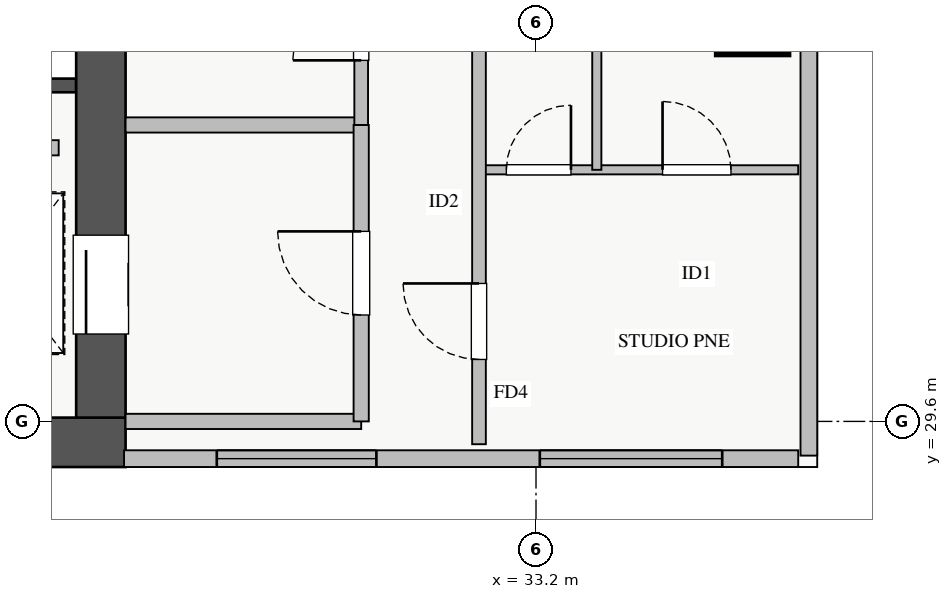
"""IFC4 building model, lengths in metres.
Left out: names, types, materials, properties, quantities, classifications, styles, units other than length and angle.
Written with IfcOpenShell. Run it as: python <this file> out.ifc"""

import sys

from ifc_helpers import new_model, si_unit, direction, frame, frame_2d, origin, origin_2d, place, context, subcontext, project, spatial, rectangle, extrude, source, transform, mapped, element, fill, save


model = new_model("IFC4")
c1 = context("Model", 3, precision=1e-05, world=origin(), true_north=direction((0.0, 1.0)))
c2 = subcontext(c1, "Body", "Model", "MODEL_VIEW")
j1 = project(units=[si_unit("LENGTHUNIT", "METRE"), si_unit("PLANEANGLEUNIT", "RADIAN")], contexts=[c1])
p1 = place(None, origin())
s1 = spatial("IfcSite", under=j1, at=p1, CompositionType="ELEMENT")
p2 = place(p1, origin())
s2 = spatial("IfcBuilding", under=s1, at=p2, CompositionType="ELEMENT")
p3 = place(p2, frame((0.0, 0.0, 156.75)))
s3 = spatial("IfcBuildingStorey", under=s2, at=p3, CompositionType="ELEMENT", Elevation=156.75)
p4 = place(p3, frame((25.8, 34.02, 0.0), z_axis=(0.0, 0.0, 1.0), x_axis=(1.0, 0.0, 0.0)))
e1 = element("IfcWall", 1, at=p4, inside=s3, PredefinedType="SHEAR", context=c2, shape_type="SweptSolid", body=[
    extrude(rectangle(XDim=1.35, YDim=0.18, at=frame_2d((0.675, 0.0))), origin(), (0.0, 0.0, 1.0), 3.07),
])
p5 = place(p3, frame((10.2, 29.325, 0.0), z_axis=(0.0, 0.0, 1.0), x_axis=(1.0, 0.0, 0.0)))
e2 = element("IfcWall", 2, at=p5, inside=s3, PredefinedType="SHEAR", context=c2, shape_type="SweptSolid", body=[
    extrude(rectangle(XDim=17.6, YDim=0.65, at=frame_2d((8.8, 0.0))), origin(), (0.0, 0.0, 1.0), 3.25),
])
p6 = place(p3, frame((27.475, 29.65, 0.0), z_axis=(0.0, 0.0, 1.0), x_axis=(0.0, 1.0, 0.0)))
e3 = element("IfcWall", 3, at=p6, inside=s3, PredefinedType="SHEAR", context=c2, shape_type="SweptSolid", body=[
    extrude(rectangle(XDim=5.9, YDim=0.65, at=frame_2d((2.95, 0.0))), origin(), (0.0, 0.0, 1.0), 3.25),
])
p7 = place(p6, frame((1.1, 0.0, 0.0)))
e4 = element("IfcOpeningElement", 4, at=p7, cuts=e3, PredefinedType="OPENING", context=c2, shape_type="SweptSolid", body=[
    extrude(rectangle(XDim=1.3, YDim=2.05, at=frame_2d((0.65, 1.025))), frame((0.0, 0.335, 0.0), z_axis=(0.0, -1.0, 0.0), x_axis=(1.0, 0.0, 0.0)), (0.0, 0.0, 1.0), 0.67),
])
m1 = source(origin(), c2, "Body", "SweptSolid", [
    extrude(rectangle(XDim=0.95, YDim=0.95, at=origin_2d()), origin(), (0.0, 0.0, 1.0), 3.25),
])
p8 = place(p3, frame((36.05, 34.9, 0.0), z_axis=(0.0, 0.0, 1.0), x_axis=(1.0, 0.0, 0.0)))
e5 = element("IfcColumn", 5, at=p8, inside=s3, PredefinedType="COLUMN", context=c2, shape_type="MappedRepresentation", body=[
    mapped(m1, transform((0.0, 0.0, 0.0), x_axis=(1.0, 0.0, 0.0), y_axis=(0.0, 1.0, 0.0), z_axis=(0.0, 0.0, 1.0), scale=1.0)),
])
p9 = place(p3, frame((27.78, 29.11, 0.0), z_axis=(0.0, 0.0, 1.0), x_axis=(1.0, 0.0, 0.0)))
e6 = element("IfcWall", 6, at=p9, inside=s3, PredefinedType="STANDARD", context=c2, shape_type="SweptSolid", body=[
    extrude(rectangle(XDim=8.87, YDim=0.22, at=frame_2d((4.435, 0.0))), origin(), (0.0, 0.0, 1.0), 2.61),
])
p10 = place(p9, frame((1.22, 0.0, 0.9)))
e7 = element("IfcOpeningElement", 7, at=p10, cuts=e6, PredefinedType="OPENING", context=c2, shape_type="SweptSolid", body=[
    extrude(rectangle(XDim=2.1, YDim=1.48, at=frame_2d((1.05, 0.74))), frame((0.0, 0.12, 0.0), z_axis=(0.0, -1.0, 0.0), x_axis=(1.0, 0.0, 0.0)), (0.0, 0.0, 1.0), 0.24),
])
p11 = place(p9, frame((5.47, 0.0, 0.9)))
e8 = element("IfcOpeningElement", 8, at=p11, cuts=e6, PredefinedType="OPENING", context=c2, shape_type="SweptSolid", body=[
    extrude(rectangle(XDim=2.4, YDim=1.48, at=frame_2d((1.2, 0.74))), frame((0.0, 0.12, 0.0), z_axis=(0.0, -1.0, 0.0), x_axis=(1.0, 0.0, 0.0)), (0.0, 0.0, 1.0), 0.24),
])
p12 = place(p3, frame((36.79, 29.15, 0.0), z_axis=(0.0, 0.0, 1.0), x_axis=(0.0, 1.0, 0.0)))
e9 = element("IfcWall", 9, at=p12, inside=s3, PredefinedType="STANDARD", context=c2, shape_type="SweptSolid", body=[
    extrude(rectangle(XDim=6.3, YDim=0.22, at=frame_2d((3.15, 0.0))), origin(), (0.0, 0.0, 1.0), 2.61),
])
for number, where, z_axis, x_axis in (
    (10, (27.8, 29.6, 0.0), (0.0, 0.0, 1.0), (1.0, 0.0, 0.0)),
    (11, (27.8, 33.5, 0.0), (0.0, 0.0, 1.0), (1.0, 0.0, 0.0)),
):
    element("IfcWall", number, at=place(p3, frame(where, z_axis=z_axis, x_axis=x_axis)), inside=s3, PredefinedType="PARTITIONING", context=c2, shape_type="SweptSolid", body=[
        extrude(rectangle(XDim=3.1, YDim=0.2, at=frame_2d((1.55, 0.0))), origin(), (0.0, 0.0, 1.0), 3.07),
    ])
p13 = place(p3, frame((30.9, 29.6, 0.0), z_axis=(0.0, 0.0, 1.0), x_axis=(0.0, 1.0, 0.0)))
e12 = element("IfcWall", 12, at=p13, inside=s3, PredefinedType="PARTITIONING", context=c2, shape_type="SweptSolid", body=[
    extrude(rectangle(XDim=3.9, YDim=0.2, at=frame_2d((1.95, 0.0))), origin(), (0.0, 0.0, 1.0), 3.07),
])
p14 = place(p13, frame((1.4, 0.0, 0.0)))
e13 = element("IfcOpeningElement", 13, at=p14, cuts=e12, PredefinedType="OPENING", context=c2, shape_type="SweptSolid", body=[
    extrude(rectangle(XDim=1.1, YDim=2.05, at=frame_2d((0.55, 1.025))), frame((0.0, 0.11, 0.0), z_axis=(0.0, -1.0, 0.0), x_axis=(1.0, 0.0, 0.0)), (0.0, 0.0, 1.0), 0.22),
])
p15 = place(p3, frame((21.75, 33.2, 0.0), z_axis=(0.0, 0.0, 1.0), x_axis=(1.0, 0.0, 0.0)))
e14 = element("IfcWall", 14, at=p15, inside=s3, PredefinedType="PARTITIONING", context=c2, shape_type="SweptSolid", body=[
    extrude(rectangle(XDim=5.17, YDim=0.2, at=frame_2d((2.585, 0.0))), origin(), (0.0, 0.0, 1.0), 3.07),
])
p16 = place(p3, frame((30.9, 33.5, 0.0), z_axis=(0.0, 0.0, 1.0), x_axis=(0.0, 1.0, 0.0)))
e15 = element("IfcWall", 15, at=p16, inside=s3, PredefinedType="PARTITIONING", context=c2, shape_type="SweptSolid", body=[
    extrude(rectangle(XDim=2.7, YDim=0.18, at=frame_2d((1.35, 0.0))), origin(), (0.0, 0.0, 1.0), 2.577),
])
p17 = place(p16, frame((0.85, 0.0, 0.0)))
e16 = element("IfcOpeningElement", 16, at=p17, cuts=e15, PredefinedType="OPENING", context=c2, shape_type="SweptSolid", body=[
    extrude(rectangle(XDim=0.9, YDim=2.05, at=frame_2d((0.45, 1.025))), frame((0.0, 0.1, 0.0), z_axis=(0.0, -1.0, 0.0), x_axis=(1.0, 0.0, 0.0)), (0.0, 0.0, 1.0), 0.2),
])
p18 = place(p3, frame((32.45, 32.91, 0.0), z_axis=(0.0, 0.0, 1.0), x_axis=(1.0, 0.0, 0.0)))
e17 = element("IfcWall", 17, at=p18, inside=s3, PredefinedType="PLUMBINGWALL", context=c2, shape_type="SweptSolid", body=[
    extrude(rectangle(XDim=4.2, YDim=0.12, at=frame_2d((2.1, 0.0))), origin(), (0.0, 0.0, 1.0), 3.07),
])
p19 = place(p18, frame((0.36, 0.0, 0.0)))
e18 = element("IfcOpeningElement", 18, at=p19, cuts=e17, PredefinedType="OPENING", context=c2, shape_type="SweptSolid", body=[
    extrude(rectangle(XDim=0.85, YDim=2.05, at=frame_2d((0.425, 1.025))), frame((0.0, 0.07, 0.0), z_axis=(0.0, -1.0, 0.0), x_axis=(1.0, 0.0, 0.0)), (0.0, 0.0, 1.0), 0.14),
])
p20 = place(p18, frame((2.415, 0.0, 0.0)))
e19 = element("IfcOpeningElement", 19, at=p20, cuts=e17, PredefinedType="OPENING", context=c2, shape_type="SweptSolid", body=[
    extrude(rectangle(XDim=0.9, YDim=2.05, at=frame_2d((0.45, 1.025))), frame((0.0, 0.07, 0.0), z_axis=(0.0, -1.0, 0.0), x_axis=(1.0, 0.0, 0.0)), (0.0, 0.0, 1.0), 0.14),
])
p21 = place(p3, frame((34.0, 32.91, 0.0), z_axis=(0.0, 0.0, 1.0), x_axis=(0.0, 1.0, 0.0)))
e20 = element("IfcWall", 20, at=p21, inside=s3, PredefinedType="PLUMBINGWALL", context=c2, shape_type="SweptSolid", body=[
    extrude(rectangle(XDim=3.07, YDim=0.12, at=frame_2d((1.535, 0.0))), origin(), (0.0, 0.0, 1.0), 3.07),
])
p22 = place(p3, frame((32.45, 29.3, 0.0), z_axis=(0.0, 0.0, 1.0), x_axis=(0.0, 1.0, 0.0)))
e21 = element("IfcWall", 21, at=p22, inside=s3, PredefinedType="PARTITIONING", context=c2, shape_type="SweptSolid", body=[
    extrude(rectangle(XDim=11.35, YDim=0.18, at=frame_2d((5.675, 0.0))), origin(), (0.0, 0.0, 1.0), 3.07),
])
p23 = place(p22, frame((1.115, 0.0, 0.0)))
e22 = element("IfcOpeningElement", 22, at=p23, cuts=e21, PredefinedType="OPENING", context=c2, shape_type="SweptSolid", body=[
    extrude(rectangle(XDim=1.0, YDim=2.05, at=frame_2d((0.5, 1.025))), frame((0.0, 0.1, 0.0), z_axis=(0.0, -1.0, 0.0), x_axis=(1.0, 0.0, 0.0)), (0.0, 0.0, 1.0), 0.2),
])
p24 = place(p22, frame((7.12, 0.0, 0.0)))
e23 = element("IfcOpeningElement", 23, at=p24, cuts=e21, PredefinedType="OPENING", context=c2, shape_type="SweptSolid", body=[
    extrude(rectangle(XDim=0.9, YDim=2.05, at=frame_2d((0.45, 1.025))), frame((0.0, 0.1, 0.0), z_axis=(0.0, -1.0, 0.0), x_axis=(1.0, 0.0, 0.0)), (0.0, 0.0, 1.0), 0.2),
])
m2 = source(origin(), c2, "Body", "SweptSolid", [
    extrude(rectangle(XDim=2.1, YDim=1.48, at=frame_2d((1.05, 0.74))), frame((0.0, 0.03, 0.0), z_axis=(0.0, -1.0, 0.0), x_axis=(1.0, 0.0, 0.0)), (0.0, 0.0, 1.0), 0.06),
])
p25 = place(p10, origin())
e24 = element("IfcWindow", 24, at=p25, inside=s3, PartitioningType="TRIPLE_PANEL_VERTICAL", PredefinedType="WINDOW", context=c2, shape_type="MappedRepresentation", body=[
    mapped(m2, transform((0.0, 0.0, 0.0), x_axis=(1.0, 0.0, 0.0), y_axis=(0.0, 1.0, 0.0), z_axis=(0.0, 0.0, 1.0), scale=1.0)),
])
fill(e7, e24)
m3 = source(origin(), c2, "Body", "SweptSolid", [
    extrude(rectangle(XDim=2.4, YDim=1.48, at=frame_2d((1.2, 0.74))), frame((0.0, 0.03, 0.0), z_axis=(0.0, -1.0, 0.0), x_axis=(1.0, 0.0, 0.0)), (0.0, 0.0, 1.0), 0.06),
])
p26 = place(p11, origin())
e25 = element("IfcWindow", 25, at=p26, inside=s3, PartitioningType="TRIPLE_PANEL_VERTICAL", PredefinedType="WINDOW", context=c2, shape_type="MappedRepresentation", body=[
    mapped(m3, transform((0.0, 0.0, 0.0), x_axis=(1.0, 0.0, 0.0), y_axis=(0.0, 1.0, 0.0), z_axis=(0.0, 0.0, 1.0), scale=1.0)),
])
fill(e8, e25)
m4 = source(origin(), c2, "Body", "SweptSolid", [
    extrude(rectangle(XDim=1.3, YDim=2.05, at=frame_2d((0.65, 1.025))), frame((0.0, 0.025, 0.0), z_axis=(0.0, -1.0, 0.0), x_axis=(1.0, 0.0, 0.0)), (0.0, 0.0, 1.0), 0.05),
])
p27 = place(p7, origin())
e26 = element("IfcDoor", 26, at=p27, inside=s3, OperationType="SLIDING_TO_LEFT", PredefinedType="DOOR", context=c2, shape_type="MappedRepresentation", body=[
    mapped(m4, transform((0.0, 0.0, 0.0), x_axis=(1.0, 0.0, 0.0), y_axis=(0.0, 1.0, 0.0), z_axis=(0.0, 0.0, 1.0), scale=1.0)),
])
fill(e4, e26)
m5 = source(origin(), c2, "Body", "SweptSolid", [
    extrude(rectangle(XDim=1.1, YDim=2.05, at=frame_2d((0.55, 1.025))), frame((0.0, 0.025, 0.0), z_axis=(0.0, -1.0, 0.0), x_axis=(1.0, 0.0, 0.0)), (0.0, 0.0, 1.0), 0.05),
])
p28 = place(p14, origin())
e27 = element("IfcDoor", 27, at=p28, inside=s3, OperationType="SINGLE_SWING_RIGHT", PredefinedType="DOOR", context=c2, shape_type="MappedRepresentation", body=[
    mapped(m5, transform((0.0, 0.0, 0.0), x_axis=(1.0, 0.0, 0.0), y_axis=(0.0, 1.0, 0.0), z_axis=(0.0, 0.0, 1.0), scale=1.0)),
])
fill(e13, e27)
m6 = source(origin(), c2, "Body", "SweptSolid", [
    extrude(rectangle(XDim=0.9, YDim=2.05, at=frame_2d((0.45, 1.025))), frame((0.0, 0.025, 0.0), z_axis=(0.0, -1.0, 0.0), x_axis=(1.0, 0.0, 0.0)), (0.0, 0.0, 1.0), 0.05),
])
p29 = place(p17, origin())
e28 = element("IfcDoor", 28, at=p29, inside=s3, OperationType="SINGLE_SWING_LEFT", PredefinedType="DOOR", context=c2, shape_type="MappedRepresentation", body=[
    mapped(m6, transform((0.0, 0.0, 0.0), x_axis=(1.0, 0.0, 0.0), y_axis=(0.0, 1.0, 0.0), z_axis=(0.0, 0.0, 1.0), scale=1.0)),
])
fill(e16, e28)
m7 = source(origin(), c2, "Body", "SweptSolid", [
    extrude(rectangle(XDim=0.85, YDim=2.05, at=frame_2d((0.425, 1.025))), frame((0.0, 0.025, 0.0), z_axis=(0.0, -1.0, 0.0), x_axis=(1.0, 0.0, 0.0)), (0.0, 0.0, 1.0), 0.05),
])
p30 = place(p19, origin())
e29 = element("IfcDoor", 29, at=p30, inside=s3, OperationType="SINGLE_SWING_RIGHT", PredefinedType="DOOR", context=c2, shape_type="MappedRepresentation", body=[
    mapped(m7, transform((0.0, 0.0, 0.0), x_axis=(1.0, 0.0, 0.0), y_axis=(0.0, 1.0, 0.0), z_axis=(0.0, 0.0, 1.0), scale=1.0)),
])
fill(e18, e29)
p31 = place(p20, origin())
e30 = element("IfcDoor", 30, at=p31, inside=s3, OperationType="SINGLE_SWING_LEFT", PredefinedType="DOOR", context=c2, shape_type="MappedRepresentation", body=[
    mapped(m6, transform((0.0, 0.0, 0.0), x_axis=(1.0, 0.0, 0.0), y_axis=(0.0, 1.0, 0.0), z_axis=(0.0, 0.0, 1.0), scale=1.0)),
])
fill(e19, e30)
m8 = source(origin(), c2, "Body", "SweptSolid", [
    extrude(rectangle(XDim=1.0, YDim=2.05, at=frame_2d((0.5, 1.025))), frame((0.0, 0.025, 0.0), z_axis=(0.0, -1.0, 0.0), x_axis=(1.0, 0.0, 0.0)), (0.0, 0.0, 1.0), 0.05),
])
p32 = place(p23, origin())
e31 = element("IfcDoor", 31, at=p32, inside=s3, OperationType="SINGLE_SWING_RIGHT", PredefinedType="DOOR", context=c2, shape_type="MappedRepresentation", body=[
    mapped(m8, transform((0.0, 0.0, 0.0), x_axis=(1.0, 0.0, 0.0), y_axis=(0.0, 1.0, 0.0), z_axis=(0.0, 0.0, 1.0), scale=1.0)),
])
fill(e22, e31)
save(model, sys.argv[1])
